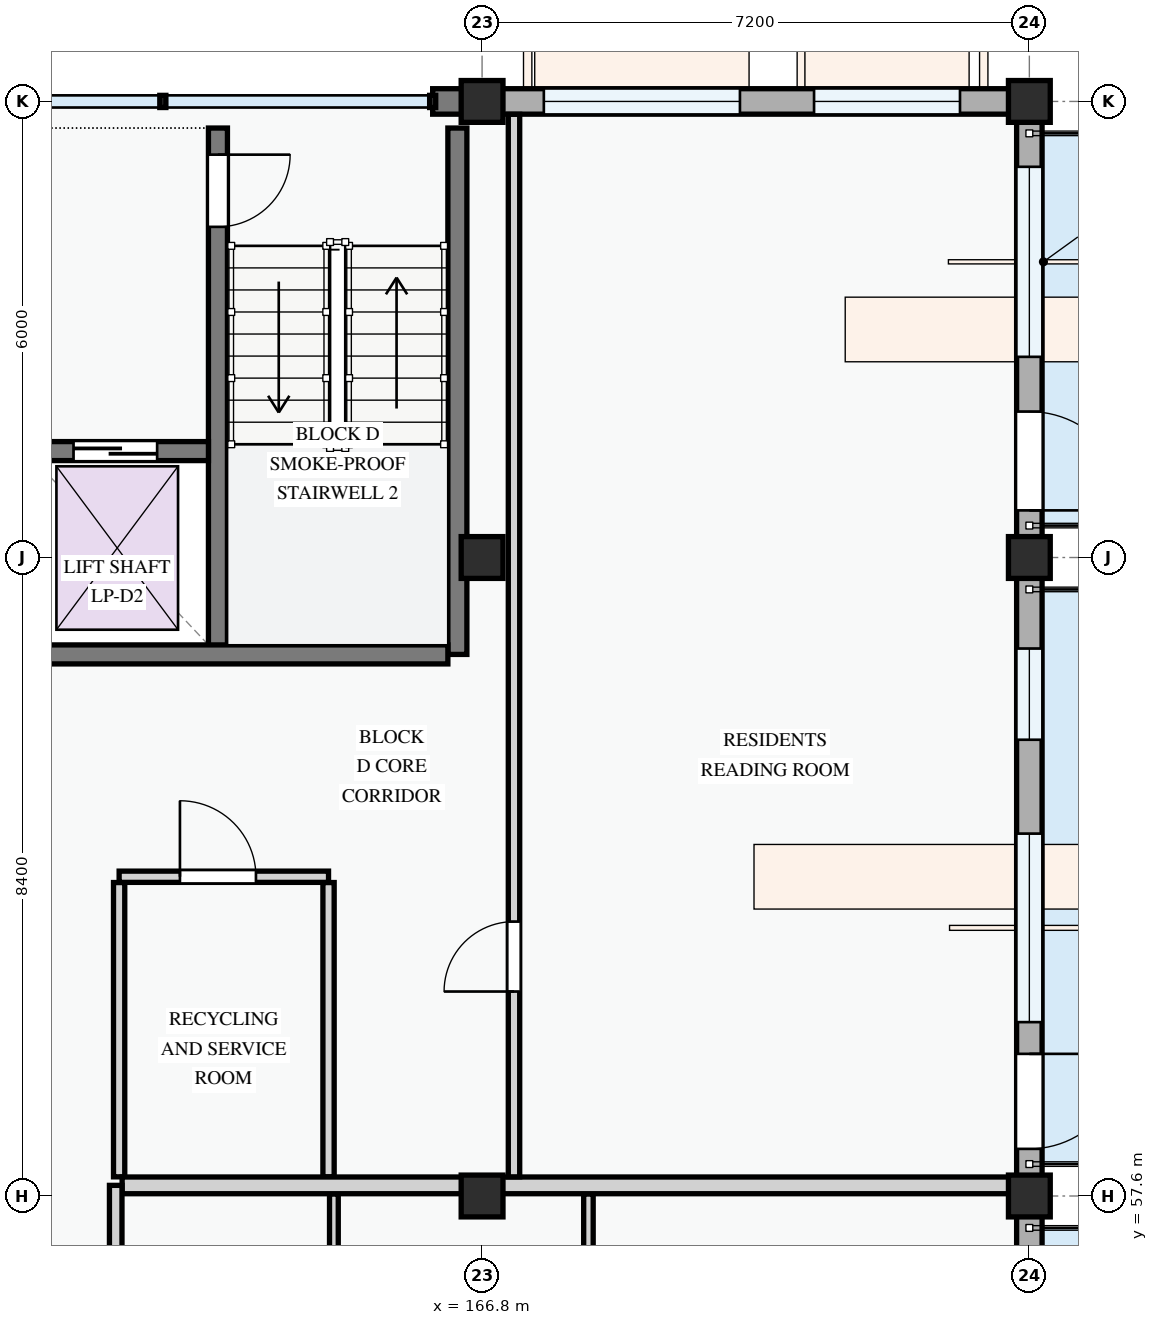
"""IFC4 building model, lengths in metres.
Left out: names, types, materials, properties, quantities, classifications, styles, units other than length and angle.
Written with IfcOpenShell. Run it as: python <this file> out.ifc"""

import sys

from ifc_helpers import new_model, si_unit, direction, frame, frame_2d, origin, origin_2d, place, context, subcontext, project, spatial, rectangle, extrude, element, fill, save


model = new_model("IFC4")
c1 = context("Model", 3, precision=1e-05, world=origin(), true_north=direction((0.0, 1.0)))
c2 = subcontext(c1, "Body", "Model", "MODEL_VIEW")
j1 = project(units=[si_unit("LENGTHUNIT", "METRE"), si_unit("PLANEANGLEUNIT", "RADIAN")], contexts=[c1])
p1 = place(None, origin())
s1 = spatial("IfcSite", under=j1, at=p1, CompositionType="ELEMENT")
p2 = place(p1, origin())
s2 = spatial("IfcBuilding", under=s1, at=p2, CompositionType="ELEMENT")
p3 = place(p2, frame((0.0, 0.0, 8.1)))
s3 = spatial("IfcBuildingStorey", under=s2, at=p3, CompositionType="ELEMENT", Elevation=8.1)
for number, where, z_axis, x_axis in (
    (1, (166.8, 57.6, 0.0), (0.0, 0.0, 1.0), (1.0, 0.0, 0.0)),
    (2, (166.8, 66.0, 0.0), (0.0, 0.0, 1.0), (1.0, 0.0, 0.0)),
    (3, (166.8, 72.0, 0.0), (0.0, 0.0, 1.0), (1.0, 0.0, 0.0)),
    (4, (174.0, 57.6, 0.0), (0.0, 0.0, 1.0), (1.0, 0.0, 0.0)),
    (5, (174.0, 66.0, 0.0), (0.0, 0.0, 1.0), (1.0, 0.0, 0.0)),
    (6, (174.0, 72.0, 0.0), (0.0, 0.0, 1.0), (1.0, 0.0, 0.0)),
):
    element("IfcColumn", number, at=place(p3, frame(where, z_axis=z_axis, x_axis=x_axis)), inside=s3, PredefinedType="COLUMN", context=c2, shape_type="SweptSolid", body=[
        extrude(rectangle(XDim=0.55, YDim=0.55, at=origin_2d()), origin(), (0.0, 0.0, 1.0), 3.3),
    ])
p4 = place(p3, frame((174.0, 51.6, 0.0), z_axis=(0.0, 0.0, 1.0), x_axis=(0.0, 1.0, 0.0)))
e7 = element("IfcWall", 7, at=p4, inside=s3, PredefinedType="STANDARD", context=c2, shape_type="SweptSolid", body=[
    extrude(rectangle(XDim=6.0, YDim=0.335, at=frame_2d((3.0, 0.0))), origin(), (0.0, 0.0, 1.0), 2.575),
])
p5 = place(p4, frame((0.62, 0.0, 0.0)))
e8 = element("IfcOpeningElement", 8, at=p5, cuts=e7, PredefinedType="OPENING", context=c2, shape_type="SweptSolid", body=[
    extrude(rectangle(XDim=1.2, YDim=2.15, at=frame_2d((0.6, 1.075))), frame((0.0, 0.177, 0.0), z_axis=(0.0, -1.0, 0.0), x_axis=(1.0, 0.0, 0.0)), (0.0, 0.0, 1.0), 0.355),
])
p6 = place(p4, frame((2.665, 0.0, 0.78)))
e9 = element("IfcOpeningElement", 9, at=p6, cuts=e7, PredefinedType="OPENING", context=c2, shape_type="SweptSolid", body=[
    extrude(rectangle(XDim=2.35, YDim=1.55, at=frame_2d((1.175, 0.775))), frame((0.0, 0.177, 0.0), z_axis=(0.0, -1.0, 0.0), x_axis=(1.0, 0.0, 0.0)), (0.0, 0.0, 1.0), 0.355),
])
p7 = place(p3, frame((174.0, 57.6, 0.0), z_axis=(0.0, 0.0, 1.0), x_axis=(0.0, 1.0, 0.0)))
e10 = element("IfcWall", 10, at=p7, inside=s3, PredefinedType="STANDARD", context=c2, shape_type="SweptSolid", body=[
    extrude(rectangle(XDim=8.4, YDim=0.335, at=frame_2d((4.2, 0.0))), origin(), (0.0, 0.0, 1.0), 2.425),
])
p8 = place(p7, frame((0.62, 0.0, 0.0)))
e11 = element("IfcOpeningElement", 11, at=p8, cuts=e10, PredefinedType="OPENING", context=c2, shape_type="SweptSolid", body=[
    extrude(rectangle(XDim=1.25, YDim=2.2, at=frame_2d((0.625, 1.1))), frame((0.0, 0.177, 0.0), z_axis=(0.0, -1.0, 0.0), x_axis=(1.0, 0.0, 0.0)), (0.0, 0.0, 1.0), 0.355),
])
p9 = place(p7, frame((2.288, 0.0, 0.78)))
e12 = element("IfcOpeningElement", 12, at=p9, cuts=e10, PredefinedType="OPENING", context=c2, shape_type="SweptSolid", body=[
    extrude(rectangle(XDim=2.48, YDim=1.46, at=frame_2d((1.24, 0.73))), frame((0.0, 0.177, 0.0), z_axis=(0.0, -1.0, 0.0), x_axis=(1.0, 0.0, 0.0)), (0.0, 0.0, 1.0), 0.355),
])
p10 = place(p7, frame((6.002, 0.0, 0.78)))
e13 = element("IfcOpeningElement", 13, at=p10, cuts=e10, PredefinedType="OPENING", context=c2, shape_type="SweptSolid", body=[
    extrude(rectangle(XDim=1.2, YDim=1.5, at=frame_2d((0.6, 0.75))), frame((0.0, 0.177, 0.0), z_axis=(0.0, -1.0, 0.0), x_axis=(1.0, 0.0, 0.0)), (0.0, 0.0, 1.0), 0.355),
])
p11 = place(p3, frame((174.0, 66.0, 0.0), z_axis=(0.0, 0.0, 1.0), x_axis=(0.0, 1.0, 0.0)))
e14 = element("IfcWall", 14, at=p11, inside=s3, PredefinedType="STANDARD", context=c2, shape_type="SweptSolid", body=[
    extrude(rectangle(XDim=6.0, YDim=0.335, at=frame_2d((3.0, 0.0))), origin(), (0.0, 0.0, 1.0), 2.575),
])
p12 = place(p11, frame((0.62, 0.0, 0.0)))
e15 = element("IfcOpeningElement", 15, at=p12, cuts=e14, PredefinedType="OPENING", context=c2, shape_type="SweptSolid", body=[
    extrude(rectangle(XDim=1.3, YDim=2.15, at=frame_2d((0.65, 1.075))), frame((0.0, 0.177, 0.0), z_axis=(0.0, -1.0, 0.0), x_axis=(1.0, 0.0, 0.0)), (0.0, 0.0, 1.0), 0.355),
])
p13 = place(p11, frame((2.64, 0.0, 0.78)))
e16 = element("IfcOpeningElement", 16, at=p13, cuts=e14, PredefinedType="OPENING", context=c2, shape_type="SweptSolid", body=[
    extrude(rectangle(XDim=2.5, YDim=1.6, at=frame_2d((1.25, 0.8))), frame((0.0, 0.177, 0.0), z_axis=(0.0, -1.0, 0.0), x_axis=(1.0, 0.0, 0.0)), (0.0, 0.0, 1.0), 0.355),
])
p14 = place(p3, frame((174.0, 72.0, 0.0), z_axis=(0.0, 0.0, 1.0), x_axis=(-1.0, 0.0, 0.0)))
e17 = element("IfcWall", 17, at=p14, inside=s3, PredefinedType="STANDARD", context=c2, shape_type="SweptSolid", body=[
    extrude(rectangle(XDim=7.2, YDim=0.335, at=frame_2d((3.6, 0.0))), origin(), (0.0, 0.0, 1.0), 2.375),
])
p15 = place(p14, frame((0.913, 0.0, 0.78)))
e18 = element("IfcOpeningElement", 18, at=p15, cuts=e17, PredefinedType="OPENING", context=c2, shape_type="SweptSolid", body=[
    extrude(rectangle(XDim=1.92, YDim=1.44, at=frame_2d((0.96, 0.72))), frame((0.0, 0.177, 0.0), z_axis=(0.0, -1.0, 0.0), x_axis=(1.0, 0.0, 0.0)), (0.0, 0.0, 1.0), 0.355),
])
p16 = place(p14, frame((3.808, 0.0, 0.78)))
e19 = element("IfcOpeningElement", 19, at=p16, cuts=e17, PredefinedType="OPENING", context=c2, shape_type="SweptSolid", body=[
    extrude(rectangle(XDim=2.58, YDim=1.48, at=frame_2d((1.29, 0.74))), frame((0.0, 0.177, 0.0), z_axis=(0.0, -1.0, 0.0), x_axis=(1.0, 0.0, 0.0)), (0.0, 0.0, 1.0), 0.355),
])
p17 = place(p3, frame((166.8, 72.0, 0.0), z_axis=(0.0, 0.0, 1.0), x_axis=(-1.0, 0.0, 0.0)))
e20 = element("IfcWall", 20, at=p17, inside=s3, PredefinedType="STANDARD", context=c2, shape_type="SweptSolid", body=[
    extrude(rectangle(XDim=0.65, YDim=0.335, at=frame_2d((0.325, 0.0))), origin(), (0.0, 0.0, 1.0), 3.04),
])
p18 = place(p3, frame((166.475, 71.65, 0.0), z_axis=(0.0, 0.0, 1.0), x_axis=(0.0, -1.0, 0.0)))
e21 = element("IfcWall", 21, at=p18, inside=s3, PredefinedType="SHEAR", context=c2, shape_type="SweptSolid", body=[
    extrude(rectangle(XDim=6.925, YDim=0.25, at=frame_2d((3.462, 0.0))), origin(), (0.0, 0.0, 1.0), 3.0),
])
p19 = place(p3, frame((163.325, 71.65, 0.0), z_axis=(0.0, 0.0, 1.0), x_axis=(0.0, -1.0, 0.0)))
e22 = element("IfcWall", 22, at=p19, inside=s3, PredefinedType="SHEAR", context=c2, shape_type="SweptSolid", body=[
    extrude(rectangle(XDim=6.925, YDim=0.25, at=frame_2d((3.462, 0.0))), origin(), (0.0, 0.0, 1.0), 3.0),
])
p20 = place(p19, frame((0.35, 0.0, 0.0)))
e23 = element("IfcOpeningElement", 23, at=p20, cuts=e22, PredefinedType="OPENING", context=c2, shape_type="SweptSolid", body=[
    extrude(rectangle(XDim=0.95, YDim=2.1, at=frame_2d((0.475, 1.05))), frame((0.0, 0.135, 0.0), z_axis=(0.0, -1.0, 0.0), x_axis=(1.0, 0.0, 0.0)), (0.0, 0.0, 1.0), 0.27),
])
p21 = place(p3, frame((160.775, 67.4, 0.0), z_axis=(0.0, 0.0, 1.0), x_axis=(1.0, 0.0, 0.0)))
e24 = element("IfcWall", 24, at=p21, inside=s3, PredefinedType="SHEAR", context=c2, shape_type="SweptSolid", body=[
    extrude(rectangle(XDim=2.425, YDim=0.25, at=frame_2d((1.212, 0.0))), origin(), (0.0, 0.0, 1.0), 3.0),
])
p22 = place(p21, frame((0.65, 0.0, 0.0)))
e25 = element("IfcOpeningElement", 25, at=p22, cuts=e24, PredefinedType="OPENING", context=c2, shape_type="SweptSolid", body=[
    extrude(rectangle(XDim=1.1, YDim=2.15, at=frame_2d((0.55, 1.075))), frame((0.0, 0.135, 0.0), z_axis=(0.0, -1.0, 0.0), x_axis=(1.0, 0.0, 0.0)), (0.0, 0.0, 1.0), 0.27),
])
p23 = place(p3, frame((152.85, 64.725, 0.0), z_axis=(0.0, 0.0, 1.0), x_axis=(1.0, 0.0, 0.0)))
e26 = element("IfcWall", 26, at=p23, inside=s3, PredefinedType="SHEAR", context=c2, shape_type="SweptSolid", body=[
    extrude(rectangle(XDim=13.5, YDim=0.25, at=frame_2d((6.75, 0.0))), origin(), (0.0, 0.0, 1.0), 3.0),
])
p24 = place(p23, frame((6.2, 0.0, 0.0)))
e27 = element("IfcOpeningElement", 27, at=p24, cuts=e26, PredefinedType="OPENING", context=c2, shape_type="SweptSolid", body=[
    extrude(rectangle(XDim=1.1, YDim=2.15, at=frame_2d((0.55, 1.075))), frame((0.0, 0.135, 0.0), z_axis=(0.0, -1.0, 0.0), x_axis=(1.0, 0.0, 0.0)), (0.0, 0.0, 1.0), 0.27),
])
for number, where, z_axis, x_axis in (
    (28, (162.025, 61.724, 0.0), (0.0, 0.0, 1.0), (0.0, -1.0, 0.0)),
    (29, (164.78, 61.724, 0.0), (0.0, 0.0, 1.0), (0.0, -1.0, 0.0)),
):
    element("IfcWall", number, at=place(p3, frame(where, z_axis=z_axis, x_axis=x_axis)), inside=s3, PredefinedType="PARTITIONING", context=c2, shape_type="SweptSolid", body=[
        extrude(rectangle(XDim=3.872, YDim=0.148, at=frame_2d((1.936, 0.0))), origin(), (0.0, 0.0, 1.0), 3.0),
    ])
p25 = place(p3, frame((162.025, 61.8, 0.0), z_axis=(0.0, 0.0, 1.0), x_axis=(1.0, 0.0, 0.0)))
e30 = element("IfcWall", 30, at=p25, inside=s3, PredefinedType="PARTITIONING", context=c2, shape_type="SweptSolid", body=[
    extrude(rectangle(XDim=2.755, YDim=0.148, at=frame_2d((1.377, 0.0))), origin(), (0.0, 0.0, 1.0), 3.0),
])
p26 = place(p25, frame((0.8, 0.0, 0.0)))
e31 = element("IfcOpeningElement", 31, at=p26, cuts=e30, PredefinedType="OPENING", context=c2, shape_type="SweptSolid", body=[
    extrude(rectangle(XDim=1.0, YDim=2.15, at=frame_2d((0.5, 1.075))), frame((0.0, 0.084, 0.0), z_axis=(0.0, -1.0, 0.0), x_axis=(1.0, 0.0, 0.0)), (0.0, 0.0, 1.0), 0.168),
])
p27 = place(p3, frame((168.199, 49.898, 0.0), z_axis=(0.0, 0.0, 1.0), x_axis=(0.0, 1.0, 0.0)))
e32 = element("IfcWall", 32, at=p27, inside=s3, PredefinedType="PARTITIONING", context=c2, shape_type="SweptSolid", body=[
    extrude(rectangle(XDim=7.73, YDim=0.125, at=frame_2d((3.865, 0.0))), origin(), (0.0, 0.0, 1.0), 3.0),
])
p28 = place(p3, frame((164.85, 49.898, 0.0), z_axis=(0.0, 0.0, 1.0), x_axis=(0.0, 1.0, 0.0)))
e33 = element("IfcWall", 33, at=p28, inside=s3, PredefinedType="PARTITIONING", context=c2, shape_type="SweptSolid", body=[
    extrude(rectangle(XDim=7.73, YDim=0.115, at=frame_2d((3.865, 0.0))), origin(), (0.0, 0.0, 1.0), 3.0),
])
p29 = place(p3, frame((162.064, 57.74, 0.0), z_axis=(0.0, 0.0, 1.0), x_axis=(1.0, 0.0, 0.0)))
e34 = element("IfcWall", 34, at=p29, inside=s3, PredefinedType="PARTITIONING", context=c2, shape_type="SweptSolid", body=[
    extrude(rectangle(XDim=11.766, YDim=0.22, at=frame_2d((5.883, 0.0))), origin(), (0.0, 0.0, 1.0), 2.375),
])
p30 = place(p3, frame((161.98, 37.369, 0.0), z_axis=(0.0, 0.0, 1.0), x_axis=(0.0, 1.0, 0.0)))
e35 = element("IfcWall", 35, at=p30, inside=s3, PredefinedType="PARTITIONING", context=c2, shape_type="SweptSolid", body=[
    extrude(rectangle(XDim=20.371, YDim=0.165, at=frame_2d((10.185, 0.0))), origin(), (0.0, 0.0, 1.0), 3.0),
])
p31 = place(p30, frame((2.334, 0.0, 0.0)))
e36 = element("IfcOpeningElement", 36, at=p31, cuts=e35, PredefinedType="OPENING", context=c2, shape_type="SweptSolid", body=[
    extrude(rectangle(XDim=0.92, YDim=2.1, at=frame_2d((0.46, 1.05))), frame((0.0, 0.093, 0.0), z_axis=(0.0, -1.0, 0.0), x_axis=(1.0, 0.0, 0.0)), (0.0, 0.0, 1.0), 0.185),
])
p32 = place(p30, frame((9.573, 0.0, 0.0)))
e37 = element("IfcOpeningElement", 37, at=p32, cuts=e35, PredefinedType="OPENING", context=c2, shape_type="SweptSolid", body=[
    extrude(rectangle(XDim=0.96, YDim=2.12, at=frame_2d((0.48, 1.06))), frame((0.0, 0.093, 0.0), z_axis=(0.0, -1.0, 0.0), x_axis=(1.0, 0.0, 0.0)), (0.0, 0.0, 1.0), 0.185),
])
p33 = place(p3, frame((167.22, 57.852, 0.0), z_axis=(0.0, 0.0, 1.0), x_axis=(0.0, 1.0, 0.0)))
e38 = element("IfcWall", 38, at=p33, inside=s3, PredefinedType="PARTITIONING", context=c2, shape_type="SweptSolid", body=[
    extrude(rectangle(XDim=13.979, YDim=0.15, at=frame_2d((6.989, 0.0))), origin(), (0.0, 0.0, 1.0), 2.425),
])
p34 = place(p33, frame((2.438, 0.0, 0.0)))
e39 = element("IfcOpeningElement", 39, at=p34, cuts=e38, PredefinedType="OPENING", context=c2, shape_type="SweptSolid", body=[
    extrude(rectangle(XDim=0.92, YDim=2.1, at=frame_2d((0.46, 1.05))), frame((0.0, 0.085, 0.0), z_axis=(0.0, -1.0, 0.0), x_axis=(1.0, 0.0, 0.0)), (0.0, 0.0, 1.0), 0.17),
])
p35 = place(p8, frame((1.25, 0.0, 0.0), z_axis=(0.0, 0.0, 1.0), x_axis=(-1.0, 0.0, 0.0)))
e40 = element("IfcDoor", 40, at=p35, inside=s3, OperationType="SINGLE_SWING_LEFT", PredefinedType="DOOR", context=c2, shape_type="SweptSolid", body=[
    extrude(rectangle(XDim=1.25, YDim=2.2, at=frame_2d((0.625, 1.1))), frame((0.0, 0.025, 0.0), z_axis=(0.0, -1.0, 0.0), x_axis=(1.0, 0.0, 0.0)), (0.0, 0.0, 1.0), 0.05),
])
fill(e11, e40)
p36 = place(p9, origin())
e41 = element("IfcWindow", 41, at=p36, inside=s3, PartitioningType="DOUBLE_PANEL_VERTICAL", PredefinedType="WINDOW", context=c2, shape_type="SweptSolid", body=[
    extrude(rectangle(XDim=2.48, YDim=1.46, at=frame_2d((1.24, 0.73))), frame((0.0, 0.03, 0.0), z_axis=(0.0, -1.0, 0.0), x_axis=(1.0, 0.0, 0.0)), (0.0, 0.0, 1.0), 0.06),
])
fill(e12, e41)
p37 = place(p10, origin())
e42 = element("IfcWindow", 42, at=p37, inside=s3, PartitioningType="SINGLE_PANEL", PredefinedType="WINDOW", context=c2, shape_type="SweptSolid", body=[
    extrude(rectangle(XDim=1.2, YDim=1.5, at=frame_2d((0.6, 0.75))), frame((0.0, 0.03, 0.0), z_axis=(0.0, -1.0, 0.0), x_axis=(1.0, 0.0, 0.0)), (0.0, 0.0, 1.0), 0.06),
])
fill(e13, e42)
p38 = place(p12, frame((1.3, 0.0, 0.0), z_axis=(0.0, 0.0, 1.0), x_axis=(-1.0, 0.0, 0.0)))
e43 = element("IfcDoor", 43, at=p38, inside=s3, OperationType="SINGLE_SWING_RIGHT", PredefinedType="DOOR", context=c2, shape_type="SweptSolid", body=[
    extrude(rectangle(XDim=1.3, YDim=2.15, at=frame_2d((0.65, 1.075))), frame((0.0, 0.025, 0.0), z_axis=(0.0, -1.0, 0.0), x_axis=(1.0, 0.0, 0.0)), (0.0, 0.0, 1.0), 0.05),
])
fill(e15, e43)
p39 = place(p13, origin())
e44 = element("IfcWindow", 44, at=p39, inside=s3, PartitioningType="DOUBLE_PANEL_VERTICAL", PredefinedType="WINDOW", context=c2, shape_type="SweptSolid", body=[
    extrude(rectangle(XDim=2.5, YDim=1.6, at=frame_2d((1.25, 0.8))), frame((0.0, 0.03, 0.0), z_axis=(0.0, -1.0, 0.0), x_axis=(1.0, 0.0, 0.0)), (0.0, 0.0, 1.0), 0.06),
])
fill(e16, e44)
p40 = place(p15, origin())
e45 = element("IfcWindow", 45, at=p40, inside=s3, PartitioningType="DOUBLE_PANEL_VERTICAL", PredefinedType="WINDOW", context=c2, shape_type="SweptSolid", body=[
    extrude(rectangle(XDim=1.92, YDim=1.44, at=frame_2d((0.96, 0.72))), frame((0.0, 0.03, 0.0), z_axis=(0.0, -1.0, 0.0), x_axis=(1.0, 0.0, 0.0)), (0.0, 0.0, 1.0), 0.06),
])
fill(e18, e45)
p41 = place(p16, origin())
e46 = element("IfcWindow", 46, at=p41, inside=s3, PartitioningType="DOUBLE_PANEL_VERTICAL", PredefinedType="WINDOW", context=c2, shape_type="SweptSolid", body=[
    extrude(rectangle(XDim=2.58, YDim=1.48, at=frame_2d((1.29, 0.74))), frame((0.0, 0.03, 0.0), z_axis=(0.0, -1.0, 0.0), x_axis=(1.0, 0.0, 0.0)), (0.0, 0.0, 1.0), 0.06),
])
fill(e19, e46)
p42 = place(p20, origin())
e47 = element("IfcDoor", 47, at=p42, inside=s3, OperationType="SINGLE_SWING_LEFT", PredefinedType="DOOR", context=c2, shape_type="SweptSolid", body=[
    extrude(rectangle(XDim=0.95, YDim=2.1, at=frame_2d((0.475, 1.05))), frame((0.0, 0.025, 0.0), z_axis=(0.0, -1.0, 0.0), x_axis=(1.0, 0.0, 0.0)), (0.0, 0.0, 1.0), 0.05),
])
fill(e23, e47)
p43 = place(p22, origin())
e48 = element("IfcDoor", 48, at=p43, inside=s3, OperationType="SLIDING_TO_LEFT", PredefinedType="DOOR", context=c2, shape_type="SweptSolid", body=[
    extrude(rectangle(XDim=1.1, YDim=2.15, at=frame_2d((0.55, 1.075))), frame((0.0, 0.025, 0.0), z_axis=(0.0, -1.0, 0.0), x_axis=(1.0, 0.0, 0.0)), (0.0, 0.0, 1.0), 0.05),
])
fill(e25, e48)
p44 = place(p26, origin())
e49 = element("IfcDoor", 49, at=p44, inside=s3, OperationType="SINGLE_SWING_LEFT", PredefinedType="DOOR", context=c2, shape_type="SweptSolid", body=[
    extrude(rectangle(XDim=1.0, YDim=2.15, at=frame_2d((0.5, 1.075))), frame((0.0, 0.025, 0.0), z_axis=(0.0, -1.0, 0.0), x_axis=(1.0, 0.0, 0.0)), (0.0, 0.0, 1.0), 0.05),
])
fill(e31, e49)
p45 = place(p34, origin())
e50 = element("IfcDoor", 50, at=p45, inside=s3, OperationType="SINGLE_SWING_LEFT", PredefinedType="DOOR", context=c2, shape_type="SweptSolid", body=[
    extrude(rectangle(XDim=0.92, YDim=2.1, at=frame_2d((0.46, 1.05))), frame((0.0, 0.025, 0.0), z_axis=(0.0, -1.0, 0.0), x_axis=(1.0, 0.0, 0.0)), (0.0, 0.0, 1.0), 0.05),
])
fill(e39, e50)
save(model, sys.argv[1])
